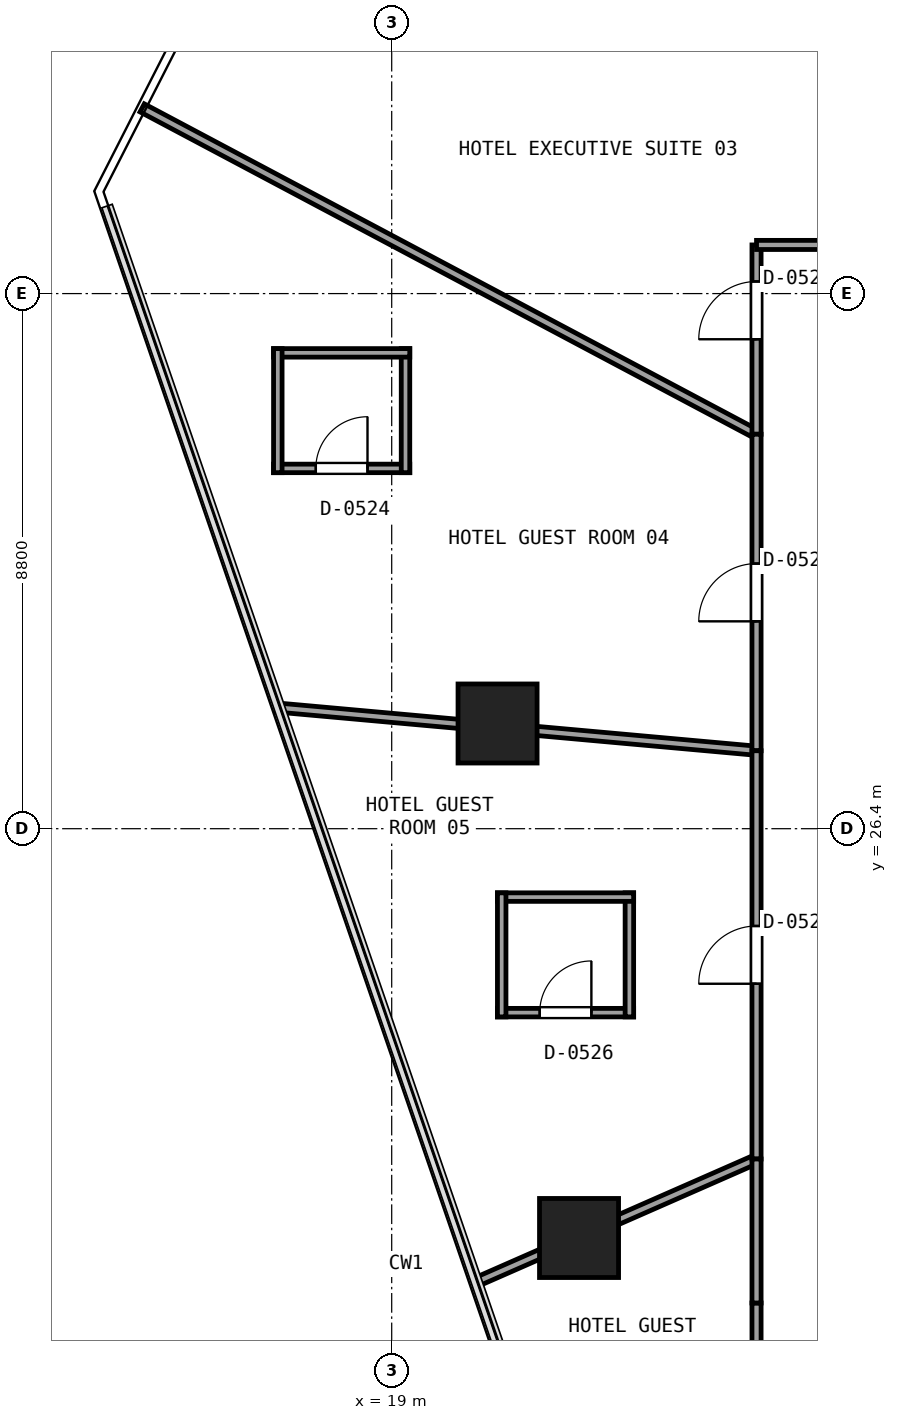
"""IFC4 building model, lengths in metres.
Left out: names, types, materials, properties, quantities, classifications, styles, units other than length and angle.
Written with IfcOpenShell. Run it as: python <this file> out.ifc"""

import sys

from ifc_helpers import new_model, si_unit, direction, frame, frame_2d, origin, origin_2d, place, context, subcontext, project, spatial, rectangle, extrude, element, fill, save


model = new_model("IFC4")
c1 = context("Model", 3, precision=1e-05, world=origin(), true_north=direction((0.0, 1.0)))
c2 = subcontext(c1, "Body", "Model", "MODEL_VIEW")
j1 = project(units=[si_unit("LENGTHUNIT", "METRE"), si_unit("PLANEANGLEUNIT", "RADIAN")], contexts=[c1])
p1 = place(None, origin())
s1 = spatial("IfcSite", under=j1, at=p1, CompositionType="ELEMENT")
p2 = place(p1, origin())
s2 = spatial("IfcBuilding", under=s1, at=p2, CompositionType="ELEMENT")
p3 = place(p2, frame((0.0, 0.0, 27.0)))
s3 = spatial("IfcBuildingStorey", under=s2, at=p3, CompositionType="ELEMENT", Elevation=27.0)
for number, where, z_axis, x_axis in (
    (1, (20.741, 28.13, -0.405), (0.0, 0.0, 1.0), (1.0, 0.0, 0.0)),
    (2, (22.081, 19.669, -0.405), (0.0, 0.0, 1.0), (1.0, 0.0, 0.0)),
):
    element("IfcColumn", number, at=place(p3, frame(where, z_axis=z_axis, x_axis=x_axis)), inside=s3, PredefinedType="COLUMN", context=c2, shape_type="SweptSolid", body=[
        extrude(rectangle(XDim=1.3, YDim=1.3, at=origin_2d()), origin(), (0.0, 0.0, 1.0), 3.575),
    ])
p4 = place(p3, frame((17.057, 32.325, 0.0), z_axis=(0.0, 0.0, 1.0), x_axis=(1.0, 0.0, 0.0)))
e3 = element("IfcWall", 3, at=p4, inside=s3, PredefinedType="PARTITIONING", context=c2, shape_type="SweptSolid", body=[
    extrude(rectangle(XDim=2.24, YDim=0.14, at=frame_2d((1.12, 0.0))), origin(), (0.0, 0.0, 1.0), 3.17),
])
p5 = place(p4, frame((0.695, 0.0, 0.0)))
e4 = element("IfcOpeningElement", 4, at=p5, cuts=e3, PredefinedType="OPENING", context=c2, shape_type="SweptSolid", body=[
    extrude(rectangle(XDim=0.85, YDim=2.1, at=frame_2d((0.425, 1.05))), frame((0.0, 0.08, 0.0), z_axis=(0.0, -1.0, 0.0), x_axis=(1.0, 0.0, 0.0)), (0.0, 0.0, 1.0), 0.16),
])
p6 = place(p3, frame((19.227, 32.255, 0.0), z_axis=(0.0, 0.0, 1.0), x_axis=(0.0, 1.0, 0.0)))
e5 = element("IfcWall", 5, at=p6, inside=s3, PredefinedType="PARTITIONING", context=c2, shape_type="SweptSolid", body=[
    extrude(rectangle(XDim=2.04, YDim=0.14, at=frame_2d((1.02, 0.0))), origin(), (0.0, 0.0, 1.0), 3.17),
])
p7 = place(p3, frame((19.297, 34.225, 0.0), z_axis=(0.0, 0.0, 1.0), x_axis=(-1.0, 0.0, 0.0)))
e6 = element("IfcWall", 6, at=p7, inside=s3, PredefinedType="PARTITIONING", context=c2, shape_type="SweptSolid", body=[
    extrude(rectangle(XDim=2.24, YDim=0.14, at=frame_2d((1.12, 0.0))), origin(), (0.0, 0.0, 1.0), 3.17),
])
p8 = place(p3, frame((17.127, 34.295, 0.0), z_axis=(0.0, 0.0, 1.0), x_axis=(0.0, -1.0, 0.0)))
e7 = element("IfcWall", 7, at=p8, inside=s3, PredefinedType="PARTITIONING", context=c2, shape_type="SweptSolid", body=[
    extrude(rectangle(XDim=2.04, YDim=0.14, at=frame_2d((1.02, 0.0))), origin(), (0.0, 0.0, 1.0), 3.17),
])
p9 = place(p3, frame((20.739, 23.375, 0.0), z_axis=(0.0, 0.0, 1.0), x_axis=(1.0, 0.0, 0.0)))
e8 = element("IfcWall", 8, at=p9, inside=s3, PredefinedType="PARTITIONING", context=c2, shape_type="SweptSolid", body=[
    extrude(rectangle(XDim=2.24, YDim=0.14, at=frame_2d((1.12, 0.0))), origin(), (0.0, 0.0, 1.0), 2.355),
])
p10 = place(p9, frame((0.695, 0.0, 0.0)))
e9 = element("IfcOpeningElement", 9, at=p10, cuts=e8, PredefinedType="OPENING", context=c2, shape_type="SweptSolid", body=[
    extrude(rectangle(XDim=0.85, YDim=2.1, at=frame_2d((0.425, 1.05))), frame((0.0, 0.08, 0.0), z_axis=(0.0, -1.0, 0.0), x_axis=(1.0, 0.0, 0.0)), (0.0, 0.0, 1.0), 0.16),
])
p11 = place(p3, frame((22.909, 23.305, 0.0), z_axis=(0.0, 0.0, 1.0), x_axis=(0.0, 1.0, 0.0)))
e10 = element("IfcWall", 10, at=p11, inside=s3, PredefinedType="PARTITIONING", context=c2, shape_type="SweptSolid", body=[
    extrude(rectangle(XDim=2.04, YDim=0.14, at=frame_2d((1.02, 0.0))), origin(), (0.0, 0.0, 1.0), 3.17),
])
p12 = place(p3, frame((22.979, 25.275, 0.0), z_axis=(0.0, 0.0, 1.0), x_axis=(-1.0, 0.0, 0.0)))
e11 = element("IfcWall", 11, at=p12, inside=s3, PredefinedType="PARTITIONING", context=c2, shape_type="SweptSolid", body=[
    extrude(rectangle(XDim=2.24, YDim=0.14, at=frame_2d((1.12, 0.0))), origin(), (0.0, 0.0, 1.0), 2.355),
])
p13 = place(p3, frame((20.809, 25.345, 0.0), z_axis=(0.0, 0.0, 1.0), x_axis=(0.0, -1.0, 0.0)))
e12 = element("IfcWall", 12, at=p13, inside=s3, PredefinedType="PARTITIONING", context=c2, shape_type="SweptSolid", body=[
    extrude(rectangle(XDim=2.04, YDim=0.14, at=frame_2d((1.02, 0.0))), origin(), (0.0, 0.0, 1.0), 3.17),
])
p14 = place(p3, frame((21.526, 46.376, 0.0), z_axis=(0.0, 0.0, 1.0), x_axis=(0.618828337745, -0.785526249341, 0.0)))
e13 = element("IfcWall", 13, at=p14, inside=s3, PredefinedType="PARTITIONING", context=c2, shape_type="SweptSolid", body=[
    extrude(rectangle(XDim=13.209, YDim=0.15, at=frame_2d((6.604, 0.0))), origin(), (0.0, 0.0, 1.0), 2.395),
])
p15 = place(p3, frame((14.896, 38.254, 0.0), z_axis=(0.0, 0.0, 1.0), x_axis=(0.883145004314, -0.469100097372, 0.0)))
e14 = element("IfcWall", 14, at=p15, inside=s3, PredefinedType="PARTITIONING", context=c2, shape_type="SweptSolid", body=[
    extrude(rectangle(XDim=11.441, YDim=0.15, at=frame_2d((5.72, 0.0))), origin(), (0.0, 0.0, 1.0), 2.355),
])
p16 = place(p3, frame((25.0, 32.887, 0.0), z_axis=(0.0, 0.0, 1.0), x_axis=(0.0, 1.0, 0.0)))
e15 = element("IfcWall", 15, at=p16, inside=s3, PredefinedType="PARTITIONING", context=c2, shape_type="SweptSolid", body=[
    extrude(rectangle(XDim=3.113, YDim=0.15, at=frame_2d((1.557, 0.0))), origin(), (0.0, 0.0, 1.0), 2.355),
])
p17 = place(p16, frame((1.562, 0.0, 0.0)))
e16 = element("IfcOpeningElement", 16, at=p17, cuts=e15, PredefinedType="OPENING", context=c2, shape_type="SweptSolid", body=[
    extrude(rectangle(XDim=0.95, YDim=2.15, at=frame_2d((0.475, 1.075))), frame((0.0, 0.085, 0.0), z_axis=(0.0, -1.0, 0.0), x_axis=(1.0, 0.0, 0.0)), (0.0, 0.0, 1.0), 0.17),
])
p18 = place(p3, frame((25.0, 36.0, 0.0), z_axis=(0.0, 0.0, 1.0), x_axis=(1.0, 0.0, 0.0)))
e17 = element("IfcWall", 17, at=p18, inside=s3, PredefinedType="PARTITIONING", context=c2, shape_type="SweptSolid", body=[
    extrude(rectangle(XDim=1.8, YDim=0.15, at=frame_2d((0.9, 0.0))), origin(), (0.0, 0.0, 1.0), 2.355),
])
p19 = place(p3, frame((17.102, 28.394, 0.0), z_axis=(0.0, 0.0, 1.0), x_axis=(0.995959307565, -0.089805666157, 0.0)))
e18 = element("IfcWall", 18, at=p19, inside=s3, PredefinedType="PARTITIONING", context=c2, shape_type="SweptSolid", body=[
    extrude(rectangle(XDim=7.93, YDim=0.15, at=frame_2d((3.965, 0.0))), origin(), (0.0, 0.0, 1.0), 2.395),
])
p20 = place(p3, frame((25.0, 27.682, 0.0), z_axis=(0.0, 0.0, 1.0), x_axis=(0.0, 1.0, 0.0)))
e19 = element("IfcWall", 19, at=p20, inside=s3, PredefinedType="PARTITIONING", context=c2, shape_type="SweptSolid", body=[
    extrude(rectangle(XDim=5.205, YDim=0.15, at=frame_2d((2.603, 0.0))), origin(), (0.0, 0.0, 1.0), 2.395),
])
p21 = place(p20, frame((2.128, 0.0, 0.0)))
e20 = element("IfcOpeningElement", 20, at=p21, cuts=e19, PredefinedType="OPENING", context=c2, shape_type="SweptSolid", body=[
    extrude(rectangle(XDim=0.95, YDim=2.15, at=frame_2d((0.475, 1.075))), frame((0.0, 0.085, 0.0), z_axis=(0.0, -1.0, 0.0), x_axis=(1.0, 0.0, 0.0)), (0.0, 0.0, 1.0), 0.17),
])
p22 = place(p3, frame((20.36, 18.93, 0.0), z_axis=(0.0, 0.0, 1.0), x_axis=(0.915567029413, 0.402165407079, 0.0)))
e21 = element("IfcWall", 21, at=p22, inside=s3, PredefinedType="PARTITIONING", context=c2, shape_type="SweptSolid", body=[
    extrude(rectangle(XDim=5.068, YDim=0.15, at=frame_2d((2.534, 0.0))), origin(), (0.0, 0.0, 1.0), 2.395),
])
p23 = place(p3, frame((25.0, 20.968, 0.0), z_axis=(0.0, 0.0, 1.0), x_axis=(0.0, 1.0, 0.0)))
e22 = element("IfcWall", 22, at=p23, inside=s3, PredefinedType="PARTITIONING", context=c2, shape_type="SweptSolid", body=[
    extrude(rectangle(XDim=6.714, YDim=0.15, at=frame_2d((3.357, 0.0))), origin(), (0.0, 0.0, 1.0), 2.395),
])
p24 = place(p23, frame((2.882, 0.0, 0.0)))
e23 = element("IfcOpeningElement", 23, at=p24, cuts=e22, PredefinedType="OPENING", context=c2, shape_type="SweptSolid", body=[
    extrude(rectangle(XDim=0.95, YDim=2.15, at=frame_2d((0.475, 1.075))), frame((0.0, 0.085, 0.0), z_axis=(0.0, -1.0, 0.0), x_axis=(1.0, 0.0, 0.0)), (0.0, 0.0, 1.0), 0.17),
])
p25 = place(p3, frame((25.0, 16.8, 0.0), z_axis=(0.0, 0.0, 1.0), x_axis=(0.0, 1.0, 0.0)))
e24 = element("IfcWall", 24, at=p25, inside=s3, PredefinedType="PARTITIONING", context=c2, shape_type="SweptSolid", body=[
    extrude(rectangle(XDim=1.8, YDim=0.15, at=frame_2d((0.9, 0.0))), origin(), (0.0, 0.0, 1.0), 2.355),
])
p26 = place(p3, frame((25.0, 18.6, 0.0), z_axis=(0.0, 0.0, 1.0), x_axis=(0.0, 1.0, 0.0)))
e25 = element("IfcWall", 25, at=p26, inside=s3, PredefinedType="PARTITIONING", context=c2, shape_type="SweptSolid", body=[
    extrude(rectangle(XDim=2.368, YDim=0.15, at=frame_2d((1.184, 0.0))), origin(), (0.0, 0.0, 1.0), 2.395),
])
p27 = place(p17, origin())
e26 = element("IfcDoor", 26, at=p27, inside=s3, OperationType="SINGLE_SWING_LEFT", PredefinedType="DOOR", context=c2, shape_type="SweptSolid", body=[
    extrude(rectangle(XDim=0.95, YDim=2.15, at=frame_2d((0.475, 1.075))), frame((0.0, 0.025, 0.0), z_axis=(0.0, -1.0, 0.0), x_axis=(1.0, 0.0, 0.0)), (0.0, 0.0, 1.0), 0.05),
])
fill(e16, e26)
p28 = place(p21, origin())
e27 = element("IfcDoor", 27, at=p28, inside=s3, OperationType="SINGLE_SWING_LEFT", PredefinedType="DOOR", context=c2, shape_type="SweptSolid", body=[
    extrude(rectangle(XDim=0.95, YDim=2.15, at=frame_2d((0.475, 1.075))), frame((0.0, 0.025, 0.0), z_axis=(0.0, -1.0, 0.0), x_axis=(1.0, 0.0, 0.0)), (0.0, 0.0, 1.0), 0.05),
])
fill(e20, e27)
p29 = place(p5, origin())
e28 = element("IfcDoor", 28, at=p29, inside=s3, OperationType="SINGLE_SWING_RIGHT", PredefinedType="DOOR", context=c2, shape_type="SweptSolid", body=[
    extrude(rectangle(XDim=0.85, YDim=2.1, at=frame_2d((0.425, 1.05))), frame((0.0, 0.025, 0.0), z_axis=(0.0, -1.0, 0.0), x_axis=(1.0, 0.0, 0.0)), (0.0, 0.0, 1.0), 0.05),
])
fill(e4, e28)
p30 = place(p24, origin())
e29 = element("IfcDoor", 29, at=p30, inside=s3, OperationType="SINGLE_SWING_LEFT", PredefinedType="DOOR", context=c2, shape_type="SweptSolid", body=[
    extrude(rectangle(XDim=0.95, YDim=2.15, at=frame_2d((0.475, 1.075))), frame((0.0, 0.025, 0.0), z_axis=(0.0, -1.0, 0.0), x_axis=(1.0, 0.0, 0.0)), (0.0, 0.0, 1.0), 0.05),
])
fill(e23, e29)
p31 = place(p10, origin())
e30 = element("IfcDoor", 30, at=p31, inside=s3, OperationType="SINGLE_SWING_RIGHT", PredefinedType="DOOR", context=c2, shape_type="SweptSolid", body=[
    extrude(rectangle(XDim=0.85, YDim=2.1, at=frame_2d((0.425, 1.05))), frame((0.0, 0.025, 0.0), z_axis=(0.0, -1.0, 0.0), x_axis=(1.0, 0.0, 0.0)), (0.0, 0.0, 1.0), 0.05),
])
fill(e9, e30)
save(model, sys.argv[1])
